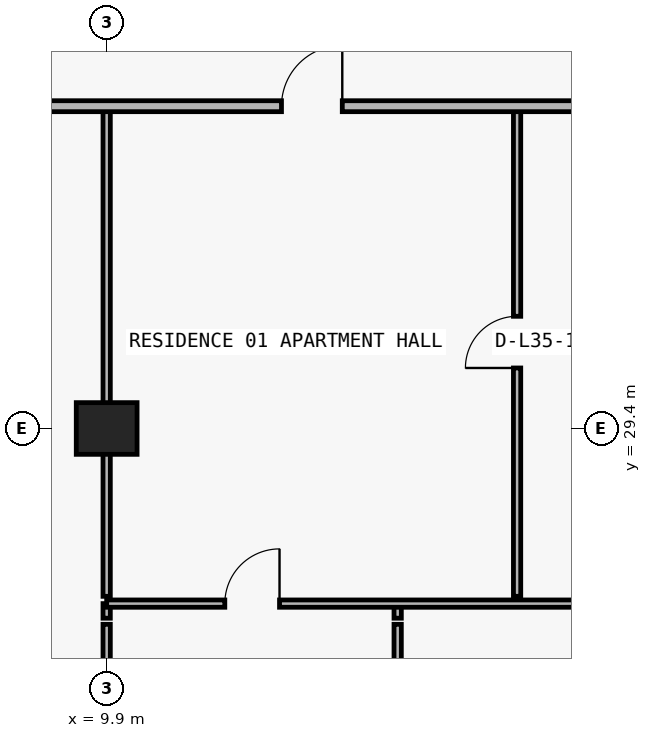
"""IFC4 building model, lengths in metres.
Left out: names, types, materials, properties, quantities, classifications, styles, units other than length and angle.
Written with IfcOpenShell. Run it as: python <this file> out.ifc"""

import sys

from ifc_helpers import new_model, si_unit, direction, frame, frame_2d, origin, origin_2d, place, context, subcontext, project, spatial, rectangle, extrude, element, fill, save


model = new_model("IFC4")
c1 = context("Model", 3, precision=1e-05, world=origin(), true_north=direction((0.0, 1.0)))
c2 = subcontext(c1, "Body", "Model", "MODEL_VIEW")
j1 = project(units=[si_unit("LENGTHUNIT", "METRE"), si_unit("PLANEANGLEUNIT", "RADIAN")], contexts=[c1])
p1 = place(None, origin())
s1 = spatial("IfcSite", under=j1, at=p1, CompositionType="ELEMENT")
p2 = place(p1, origin())
s2 = spatial("IfcBuilding", under=s1, at=p2, CompositionType="ELEMENT")
p3 = place(p2, frame((0.0, 0.0, 129.0)))
s3 = spatial("IfcBuildingStorey", under=s2, at=p3, CompositionType="ELEMENT", Elevation=129.0)
p4 = place(p3, frame((9.9, 29.4, 0.0), z_axis=(0.0, 0.0, 1.0), x_axis=(1.0, 0.0, 0.0)))
e1 = element("IfcColumn", 1, at=p4, inside=s3, PredefinedType="COLUMN", context=c2, shape_type="SweptSolid", body=[
    extrude(rectangle(XDim=1.0, YDim=0.85, at=origin_2d()), origin(), (0.0, 0.0, 1.0), 3.05),
])
p5 = place(p3, frame((9.9, 21.49, 0.0), z_axis=(0.0, 0.0, 1.0), x_axis=(0.0, 1.0, 0.0)))
e2 = element("IfcWall", 2, at=p5, inside=s3, PredefinedType="PARTITIONING", context=c2, shape_type="SweptSolid", body=[
    extrude(rectangle(XDim=4.69, YDim=0.12, at=frame_2d((2.345, 0.0))), origin(), (0.0, 0.0, 1.0), 2.174),
])
p6 = place(p5, frame((1.895, 0.0, 0.0)))
e3 = element("IfcOpeningElement", 3, at=p6, cuts=e2, PredefinedType="OPENING", context=c2, shape_type="SweptSolid", body=[
    extrude(rectangle(XDim=0.9, YDim=2.124, at=frame_2d((0.45, 1.062))), frame((0.0, 0.07, 0.0), z_axis=(0.0, -1.0, 0.0), x_axis=(1.0, 0.0, 0.0)), (0.0, 0.0, 1.0), 0.14),
])
p7 = place(p3, frame((9.9, 26.28, 0.0), z_axis=(0.0, 0.0, 1.0), x_axis=(0.0, 1.0, 0.0)))
e4 = element("IfcWall", 4, at=p7, inside=s3, PredefinedType="PARTITIONING", context=c2, shape_type="SweptSolid", body=[
    extrude(rectangle(XDim=0.24, YDim=0.12, at=frame_2d((0.12, 0.0))), origin(), (0.0, 0.0, 1.0), 2.174),
])
p8 = place(p3, frame((9.9, 26.64, 0.0), z_axis=(0.0, 0.0, 1.0), x_axis=(0.0, 1.0, 0.0)))
e5 = element("IfcWall", 5, at=p8, inside=s3, PredefinedType="PARTITIONING", context=c2, shape_type="SweptSolid", body=[
    extrude(rectangle(XDim=8.06, YDim=0.12, at=frame_2d((4.03, 0.0))), origin(), (0.0, 0.0, 1.0), 2.174),
])
p9 = place(p3, frame((14.686, 21.49, 0.0), z_axis=(0.0, 0.0, 1.0), x_axis=(0.0, 1.0, 0.0)))
e6 = element("IfcWall", 6, at=p9, inside=s3, PredefinedType="PARTITIONING", context=c2, shape_type="SweptSolid", body=[
    extrude(rectangle(XDim=4.69, YDim=0.12, at=frame_2d((2.345, 0.0))), origin(), (0.0, 0.0, 1.0), 3.05),
])
p10 = place(p9, frame((1.895, 0.0, 0.0)))
e7 = element("IfcOpeningElement", 7, at=p10, cuts=e6, PredefinedType="OPENING", context=c2, shape_type="SweptSolid", body=[
    extrude(rectangle(XDim=0.9, YDim=2.15, at=frame_2d((0.45, 1.075))), frame((0.0, 0.07, 0.0), z_axis=(0.0, -1.0, 0.0), x_axis=(1.0, 0.0, 0.0)), (0.0, 0.0, 1.0), 0.14),
])
p11 = place(p3, frame((14.686, 26.28, 0.0), z_axis=(0.0, 0.0, 1.0), x_axis=(0.0, 1.0, 0.0)))
e8 = element("IfcWall", 8, at=p11, inside=s3, PredefinedType="PARTITIONING", context=c2, shape_type="SweptSolid", body=[
    extrude(rectangle(XDim=0.24, YDim=0.12, at=frame_2d((0.12, 0.0))), origin(), (0.0, 0.0, 1.0), 3.05),
])
p12 = place(p3, frame((16.65, 26.64, 0.0), z_axis=(0.0, 0.0, 1.0), x_axis=(0.0, 1.0, 0.0)))
e9 = element("IfcWall", 9, at=p12, inside=s3, PredefinedType="PARTITIONING", context=c2, shape_type="SweptSolid", body=[
    extrude(rectangle(XDim=8.06, YDim=0.12, at=frame_2d((4.03, 0.0))), origin(), (0.0, 0.0, 1.0), 3.05),
])
p13 = place(p12, frame((3.755, 0.0, 0.0)))
e10 = element("IfcOpeningElement", 10, at=p13, cuts=e9, PredefinedType="OPENING", context=c2, shape_type="SweptSolid", body=[
    extrude(rectangle(XDim=0.85, YDim=2.1, at=frame_2d((0.425, 1.05))), frame((0.0, 0.07, 0.0), z_axis=(0.0, -1.0, 0.0), x_axis=(1.0, 0.0, 0.0)), (0.0, 0.0, 1.0), 0.14),
])
p14 = place(p3, frame((9.9, 26.52, 0.0), z_axis=(0.0, 0.0, 1.0), x_axis=(1.0, 0.0, 0.0)))
e11 = element("IfcWall", 11, at=p14, inside=s3, PredefinedType="PARTITIONING", context=c2, shape_type="SweptSolid", body=[
    extrude(rectangle(XDim=8.35, YDim=0.12, at=frame_2d((4.175, 0.0))), origin(), (0.0, 0.0, 1.0), 3.05),
])
p15 = place(p14, frame((1.943, 0.0, 0.0)))
e12 = element("IfcOpeningElement", 12, at=p15, cuts=e11, PredefinedType="OPENING", context=c2, shape_type="SweptSolid", body=[
    extrude(rectangle(XDim=0.9, YDim=2.15, at=frame_2d((0.45, 1.075))), frame((0.0, 0.07, 0.0), z_axis=(0.0, -1.0, 0.0), x_axis=(1.0, 0.0, 0.0)), (0.0, 0.0, 1.0), 0.14),
])
p16 = place(p3, frame((7.705, 34.7, 0.0), z_axis=(0.0, 0.0, 1.0), x_axis=(1.0, 0.0, 0.0)))
e13 = element("IfcWall", 13, at=p16, inside=s3, PredefinedType="PARTITIONING", context=c2, shape_type="SweptSolid", body=[
    extrude(rectangle(XDim=10.545, YDim=0.18, at=frame_2d((5.272, 0.0))), origin(), (0.0, 0.0, 1.0), 3.05),
])
p17 = place(p16, frame((5.07, 0.0, 0.0)))
e14 = element("IfcOpeningElement", 14, at=p17, cuts=e13, PredefinedType="OPENING", context=c2, shape_type="SweptSolid", body=[
    extrude(rectangle(XDim=1.0, YDim=2.2, at=frame_2d((0.5, 1.1))), frame((0.0, 0.1, 0.0), z_axis=(0.0, -1.0, 0.0), x_axis=(1.0, 0.0, 0.0)), (0.0, 0.0, 1.0), 0.2),
])
p18 = place(p17, origin())
e15 = element("IfcDoor", 15, at=p18, inside=s3, OperationType="SINGLE_SWING_RIGHT", PredefinedType="DOOR", context=c2, shape_type="SweptSolid", body=[
    extrude(rectangle(XDim=1.0, YDim=2.2, at=frame_2d((0.5, 1.1))), frame((0.0, 0.025, 0.0), z_axis=(0.0, -1.0, 0.0), x_axis=(1.0, 0.0, 0.0)), (0.0, 0.0, 1.0), 0.05),
])
fill(e14, e15)
p19 = place(p13, origin())
e16 = element("IfcDoor", 16, at=p19, inside=s3, OperationType="SINGLE_SWING_LEFT", PredefinedType="DOOR", context=c2, shape_type="SweptSolid", body=[
    extrude(rectangle(XDim=0.85, YDim=2.1, at=frame_2d((0.425, 1.05))), frame((0.0, 0.025, 0.0), z_axis=(0.0, -1.0, 0.0), x_axis=(1.0, 0.0, 0.0)), (0.0, 0.0, 1.0), 0.05),
])
fill(e10, e16)
p20 = place(p15, origin())
e17 = element("IfcDoor", 17, at=p20, inside=s3, OperationType="SINGLE_SWING_RIGHT", PredefinedType="DOOR", context=c2, shape_type="SweptSolid", body=[
    extrude(rectangle(XDim=0.9, YDim=2.15, at=frame_2d((0.45, 1.075))), frame((0.0, 0.025, 0.0), z_axis=(0.0, -1.0, 0.0), x_axis=(1.0, 0.0, 0.0)), (0.0, 0.0, 1.0), 0.05),
])
fill(e12, e17)
save(model, sys.argv[1])
